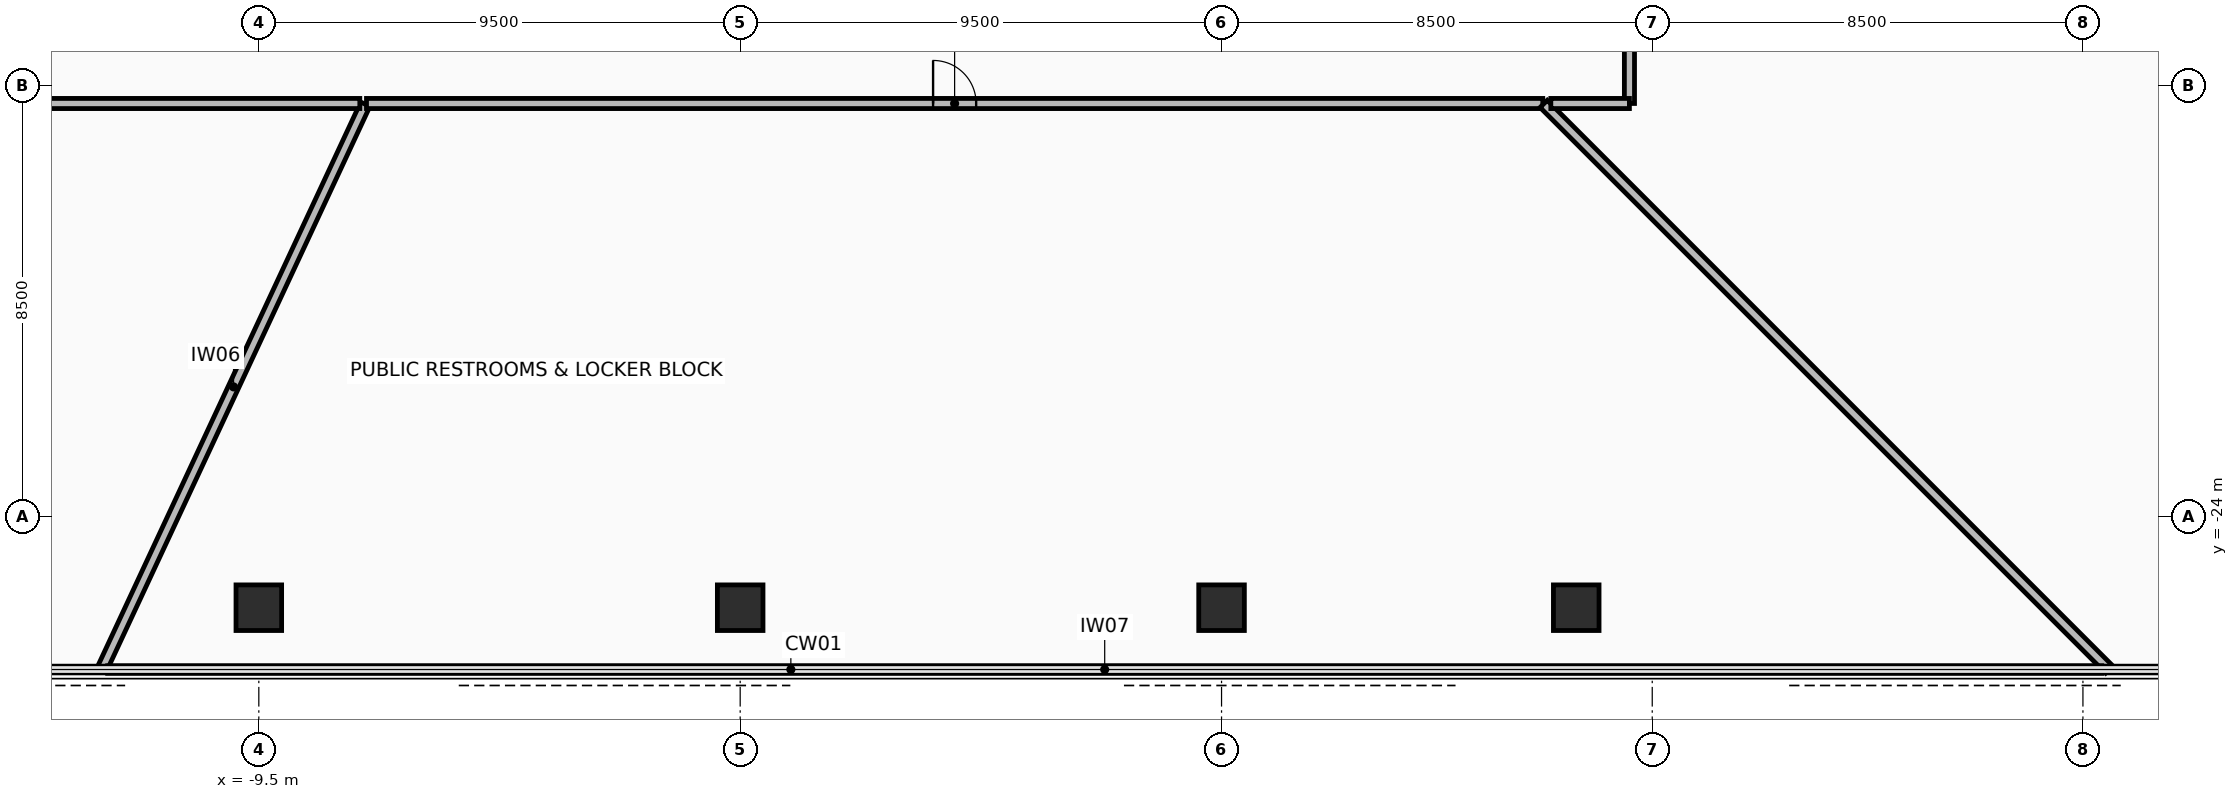
"""IFC4 building model, lengths in metres.
Left out: names, types, materials, properties, quantities, classifications, styles, units other than length and angle.
Written with IfcOpenShell. Run it as: python <this file> out.ifc"""

import sys

from ifc_helpers import new_model, si_unit, direction, frame, frame_2d, origin, origin_2d, place, context, subcontext, project, spatial, rectangle, hollow_rectangle, extrude, element, fill, save


model = new_model("IFC4")
c1 = context("Model", 3, precision=1e-05, world=origin(), true_north=direction((0.0, 1.0)))
c2 = subcontext(c1, "Body", "Model", "MODEL_VIEW")
j1 = project(units=[si_unit("LENGTHUNIT", "METRE"), si_unit("PLANEANGLEUNIT", "RADIAN")], contexts=[c1])
p1 = place(None, origin())
s1 = spatial("IfcSite", under=j1, at=p1, CompositionType="ELEMENT")
p2 = place(p1, origin())
s2 = spatial("IfcBuilding", under=s1, at=p2, CompositionType="ELEMENT")
p3 = place(p2, frame((0.0, 0.0, 21.5)))
s3 = spatial("IfcBuildingStorey", under=s2, at=p3, CompositionType="ELEMENT", Elevation=21.5)
for number, where, z_axis, x_axis in (
    (1, (-9.5, -25.8, 0.0), (0.0, 0.0, 1.0), (1.0, 0.0, 0.0)),
    (2, (0.0, -25.8, 0.0), (0.0, 0.0, 1.0), (1.0, 0.0, 0.0)),
    (3, (9.5, -25.8, 0.0), (0.0, 0.0, 1.0), (1.0, 0.0, 0.0)),
    (4, (16.5, -25.8, 0.0), (0.0, 0.0, 1.0), (1.0, 0.0, 0.0)),
):
    element("IfcColumn", number, at=place(p3, frame(where, z_axis=z_axis, x_axis=x_axis)), inside=s3, PredefinedType="COLUMN", context=c2, shape_type="SweptSolid", body=[
        extrude(hollow_rectangle(XDim=0.9, YDim=0.9, WallThickness=0.05, at=origin_2d()), origin(), (0.0, 0.0, 1.0), 5.0),
    ])
p4 = place(p3, frame((-12.6, -27.02, 0.0), z_axis=(0.0, 0.0, 1.0), x_axis=(0.422618329775, 0.906307755312, 0.0)))
e5 = element("IfcWall", 5, at=p4, inside=s3, PredefinedType="PARTITIONING", context=c2, shape_type="SweptSolid", body=[
    extrude(rectangle(XDim=12.309, YDim=0.2, at=frame_2d((6.154, 0.0))), origin(), (0.0, 0.0, 1.0), 3.135),
])
p5 = place(p3, frame((-7.375, -15.85, 0.0), z_axis=(0.0, 0.0, 1.0), x_axis=(1.0, 0.0, 0.0)))
e6 = element("IfcWall", 6, at=p5, inside=s3, PredefinedType="PARTITIONING", context=c2, shape_type="SweptSolid", body=[
    extrude(rectangle(XDim=23.215, YDim=0.2, at=frame_2d((11.607, 0.0))), origin(), (0.0, 0.0, 1.0), 3.135),
])
p6 = place(p5, frame((11.182, 0.0, 0.0)))
e7 = element("IfcOpeningElement", 7, at=p6, cuts=e6, PredefinedType="OPENING", context=c2, shape_type="SweptSolid", body=[
    extrude(rectangle(XDim=0.85, YDim=2.1, at=frame_2d((0.425, 1.05))), frame((0.0, 0.11, 0.0), z_axis=(0.0, -1.0, 0.0), x_axis=(1.0, 0.0, 0.0)), (0.0, 0.0, 1.0), 0.22),
])
p7 = place(p3, frame((15.857, -15.857, 0.0), z_axis=(0.0, 0.0, 1.0), x_axis=(0.707106781187, -0.707106781187, 0.0)))
e8 = element("IfcWall", 8, at=p7, inside=s3, PredefinedType="PARTITIONING", context=c2, shape_type="SweptSolid", body=[
    extrude(rectangle(XDim=15.786, YDim=0.2, at=frame_2d((7.893, 0.0))), origin(), (0.0, 0.0, 1.0), 2.935),
])
p8 = place(p3, frame((26.872, -27.02, 0.0), z_axis=(0.0, 0.0, 1.0), x_axis=(-1.0, 0.0, 0.0)))
e9 = element("IfcWall", 9, at=p8, inside=s3, PredefinedType="PARTITIONING", context=c2, shape_type="SweptSolid", body=[
    extrude(rectangle(XDim=39.355, YDim=0.15, at=frame_2d((19.678, 0.0))), origin(), (0.0, 0.0, 1.0), 4.74),
])
p9 = place(p3, frame((-17.525, -15.85, 0.0), z_axis=(0.0, 0.0, 1.0), x_axis=(1.0, 0.0, 0.0)))
e10 = element("IfcWall", 10, at=p9, inside=s3, PredefinedType="PARTITIONING", context=c2, shape_type="SweptSolid", body=[
    extrude(rectangle(XDim=10.018, YDim=0.2, at=frame_2d((5.009, 0.0))), origin(), (0.0, 0.0, 1.0), 2.935),
])
p10 = place(p3, frame((17.55, -15.849, 0.0), z_axis=(0.0, 0.0, 1.0), x_axis=(0.0, 1.0, 0.0)))
e11 = element("IfcWall", 11, at=p10, inside=s3, PredefinedType="PARTITIONING", context=c2, shape_type="SweptSolid", body=[
    extrude(rectangle(XDim=15.824, YDim=0.2, at=frame_2d((7.912, 0.0))), origin(), (0.0, 0.0, 1.0), 3.135),
])
p11 = place(p10, frame((7.412, 0.0, 0.0)))
e12 = element("IfcOpeningElement", 12, at=p11, cuts=e11, PredefinedType="OPENING", context=c2, shape_type="SweptSolid", body=[
    extrude(rectangle(XDim=1.0, YDim=2.15, at=frame_2d((0.5, 1.075))), frame((0.0, 0.11, 0.0), z_axis=(0.0, -1.0, 0.0), x_axis=(1.0, 0.0, 0.0)), (0.0, 0.0, 1.0), 0.22),
])
p12 = place(p3, frame((15.999, -15.85, 0.0), z_axis=(0.0, 0.0, 1.0), x_axis=(1.0, 0.0, 0.0)))
e13 = element("IfcWall", 13, at=p12, inside=s3, PredefinedType="PARTITIONING", context=c2, shape_type="SweptSolid", body=[
    extrude(rectangle(XDim=1.551, YDim=0.2, at=frame_2d((0.775, 0.0))), origin(), (0.0, 0.0, 1.0), 2.935),
])
p13 = place(p6, origin())
e14 = element("IfcDoor", 14, at=p13, inside=s3, OperationType="SINGLE_SWING_RIGHT", PredefinedType="DOOR", context=c2, shape_type="SweptSolid", body=[
    extrude(rectangle(XDim=0.85, YDim=2.1, at=frame_2d((0.425, 1.05))), frame((0.0, 0.025, 0.0), z_axis=(0.0, -1.0, 0.0), x_axis=(1.0, 0.0, 0.0)), (0.0, 0.0, 1.0), 0.05),
])
fill(e7, e14)
save(model, sys.argv[1])
